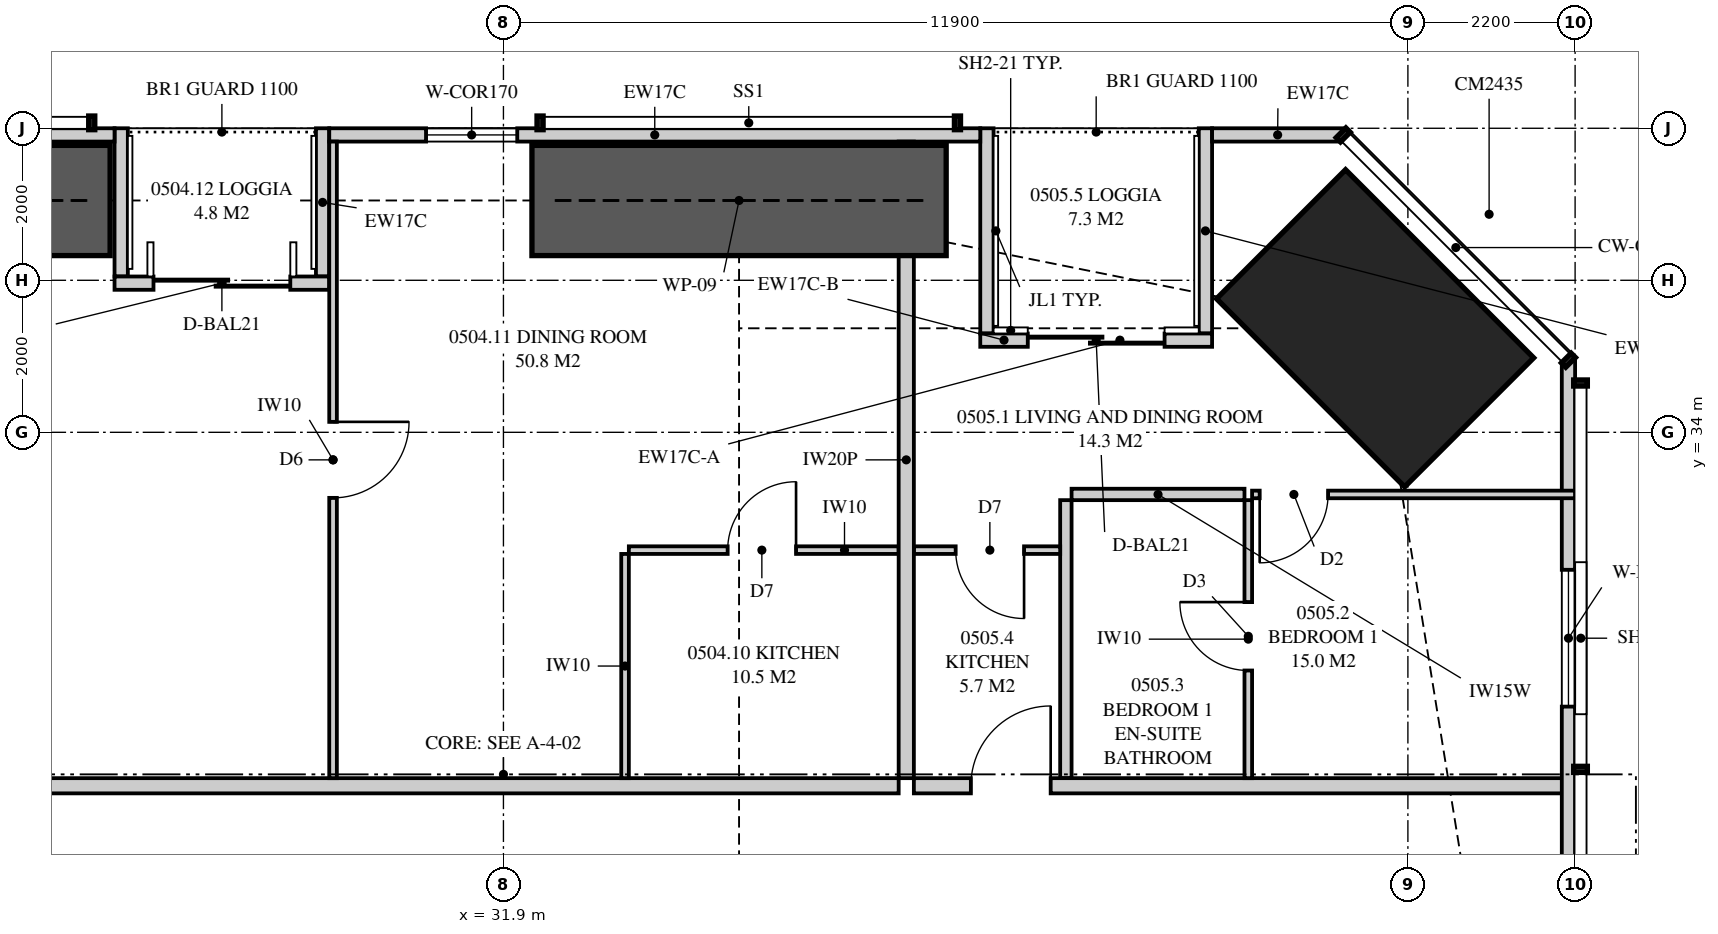
"""IFC4 building model, lengths in metres.
Left out: names, types, materials, properties, quantities, classifications, styles, units other than length and angle.
Written with IfcOpenShell. Run it as: python <this file> out.ifc"""

import sys

from ifc_helpers import new_model, si_unit, direction, frame, frame_2d, origin, origin_2d, place, context, subcontext, project, spatial, polyline, rectangle, outline, extrude, element, fill, save


model = new_model("IFC4")
c1 = context("Model", 3, precision=1e-05, world=origin(), true_north=direction((0.0, 1.0)))
c2 = subcontext(c1, "Body", "Model", "MODEL_VIEW")
j1 = project(units=[si_unit("LENGTHUNIT", "METRE"), si_unit("PLANEANGLEUNIT", "RADIAN")], contexts=[c1])
p1 = place(None, origin())
s1 = spatial("IfcSite", under=j1, at=p1, CompositionType="ELEMENT")
p2 = place(p1, origin())
s2 = spatial("IfcBuilding", under=s1, at=p2, CompositionType="ELEMENT")
p3 = place(p2, frame((0.0, 0.0, 24.35)))
s3 = spatial("IfcBuildingStorey", under=s2, at=p3, CompositionType="ELEMENT", Elevation=24.35)
p4 = place(p3, frame((43.369, 35.369, 0.0), z_axis=(0.0, 0.0, 1.0), x_axis=(-0.707106781187, -0.707106781187, 0.0)))
e1 = element("IfcColumn", 1, at=p4, inside=s3, PredefinedType="COLUMN", context=c2, shape_type="SweptSolid", body=[
    extrude(rectangle(XDim=2.4, YDim=3.5, at=origin_2d()), origin(), (0.0, 0.0, 1.0), 3.35),
])
p5 = place(p3, frame((45.913, 3.051, 0.0), z_axis=(0.0, 0.0, 1.0), x_axis=(0.0, 1.0, 0.0)))
e2 = element("IfcWall", 2, at=p5, inside=s3, PredefinedType="SOLIDWALL", context=c2, shape_type="SweptSolid", body=[
    extrude(outline(polyline([(0.0, 0.0), (31.897, 0.0), (31.897, 3.11), (22.167, 3.11), (22.167, 2.15), (22.074, 2.15), (22.074, 3.11), (21.949, 3.11), (21.949, 2.15), (9.949, 2.15), (9.949, 3.11), (9.823, 3.11), (9.823, 2.15), (9.73, 2.15), (9.73, 3.11), (0.0, 3.11), (0.0, 0.0)])), frame((0.0, 0.087, 0.0), z_axis=(0.0, -1.0, 0.0), x_axis=(1.0, 0.0, 0.0)), (0.0, 0.0, 1.0), 0.175),
])
p6 = place(p5, frame((2.257, 0.0, 0.4)))
e3 = element("IfcOpeningElement", 3, at=p6, cuts=e2, PredefinedType="OPENING", context=c2, shape_type="SweptSolid", body=[
    extrude(rectangle(XDim=1.8, YDim=1.7, at=frame_2d((0.9, 0.85))), frame((0.0, 0.097, 0.0), z_axis=(0.0, -1.0, 0.0), x_axis=(1.0, 0.0, 0.0)), (0.0, 0.0, 1.0), 0.195),
])
p7 = place(p5, frame((14.849, 0.0, 0.4)))
e4 = element("IfcOpeningElement", 4, at=p7, cuts=e2, PredefinedType="OPENING", context=c2, shape_type="SweptSolid", body=[
    extrude(rectangle(XDim=1.2, YDim=1.7, at=frame_2d((0.6, 0.85))), frame((0.0, 0.097, 0.0), z_axis=(0.0, -1.0, 0.0), x_axis=(1.0, 0.0, 0.0)), (0.0, 0.0, 1.0), 0.195),
])
p8 = place(p5, frame((27.34, 0.0, 0.4)))
e5 = element("IfcOpeningElement", 5, at=p8, cuts=e2, PredefinedType="OPENING", context=c2, shape_type="SweptSolid", body=[
    extrude(rectangle(XDim=1.8, YDim=1.7, at=frame_2d((0.9, 0.85))), frame((0.0, 0.097, 0.0), z_axis=(0.0, -1.0, 0.0), x_axis=(1.0, 0.0, 0.0)), (0.0, 0.0, 1.0), 0.195),
])
p9 = place(p3, frame((42.949, 37.913, 0.0), z_axis=(0.0, 0.0, 1.0), x_axis=(-1.0, 0.0, 0.0)))
e6 = element("IfcWall", 6, at=p9, inside=s3, PredefinedType="SOLIDWALL", context=c2, shape_type="SweptSolid", body=[
    extrude(rectangle(XDim=1.725, YDim=0.175, at=frame_2d((0.863, 0.0))), origin(), (0.0, 0.0, 1.0), 3.11),
])
p10 = place(p3, frame((38.174, 37.913, 0.0), z_axis=(0.0, 0.0, 1.0), x_axis=(-1.0, 0.0, 0.0)))
e7 = element("IfcWall", 7, at=p10, inside=s3, PredefinedType="SOLIDWALL", context=c2, shape_type="SweptSolid", body=[
    extrude(outline(polyline([(0.0, 0.0), (8.565, 0.0), (8.565, 2.15), (3.174, 2.15), (3.174, 3.11), (3.018, 3.11), (3.018, 2.15), (2.97, 2.15), (2.97, 3.11), (0.0, 3.11), (0.0, 0.0)])), frame((0.0, 0.087, 0.0), z_axis=(0.0, -1.0, 0.0), x_axis=(1.0, 0.0, 0.0)), (0.0, 0.0, 1.0), 0.175),
])
p11 = place(p10, frame((6.092, 0.0, 0.4)))
e8 = element("IfcOpeningElement", 8, at=p11, cuts=e7, PredefinedType="OPENING", context=c2, shape_type="SweptSolid", body=[
    extrude(rectangle(XDim=1.2, YDim=1.7, at=frame_2d((0.6, 0.85))), frame((0.0, 0.097, 0.0), z_axis=(0.0, -1.0, 0.0), x_axis=(1.0, 0.0, 0.0)), (0.0, 0.0, 1.0), 0.195),
])
p12 = place(p3, frame((26.783, 37.913, 0.0), z_axis=(0.0, 0.0, 1.0), x_axis=(-1.0, 0.0, 0.0)))
e9 = element("IfcWall", 9, at=p12, inside=s3, PredefinedType="SOLIDWALL", context=c2, shape_type="SweptSolid", body=[
    extrude(outline(polyline([(0.0, 0.0), (21.732, 0.0), (21.732, 3.11), (13.987, 3.11), (13.987, 2.15), (13.939, 2.15), (13.939, 3.11), (13.783, 3.11), (13.783, 2.15), (0.0, 2.15), (0.0, 0.0)])), frame((0.0, 0.087, 0.0), z_axis=(0.0, -1.0, 0.0), x_axis=(1.0, 0.0, 0.0)), (0.0, 0.0, 1.0), 0.175),
])
p13 = place(p12, frame((6.258, 0.0, 0.4)))
e10 = element("IfcOpeningElement", 10, at=p13, cuts=e9, PredefinedType="OPENING", context=c2, shape_type="SweptSolid", body=[
    extrude(rectangle(XDim=1.8, YDim=1.7, at=frame_2d((0.9, 0.85))), frame((0.0, 0.097, 0.0), z_axis=(0.0, -1.0, 0.0), x_axis=(1.0, 0.0, 0.0)), (0.0, 0.0, 1.0), 0.195),
])
p14 = place(p12, frame((9.126, 0.0, 0.4)))
e11 = element("IfcOpeningElement", 11, at=p14, cuts=e9, PredefinedType="OPENING", context=c2, shape_type="SweptSolid", body=[
    extrude(rectangle(XDim=1.8, YDim=1.7, at=frame_2d((0.9, 0.85))), frame((0.0, 0.097, 0.0), z_axis=(0.0, -1.0, 0.0), x_axis=(1.0, 0.0, 0.0)), (0.0, 0.0, 1.0), 0.195),
])
p15 = place(p12, frame((16.613, 0.0, 0.4)))
e12 = element("IfcOpeningElement", 12, at=p15, cuts=e9, PredefinedType="OPENING", context=c2, shape_type="SweptSolid", body=[
    extrude(rectangle(XDim=1.8, YDim=1.7, at=frame_2d((0.9, 0.85))), frame((0.0, 0.097, 0.0), z_axis=(0.0, -1.0, 0.0), x_axis=(1.0, 0.0, 0.0)), (0.0, 0.0, 1.0), 0.195),
])
p16 = place(p3, frame((41.224, 35.212, 0.0), z_axis=(0.0, 0.0, 1.0), x_axis=(-1.0, 0.0, 0.0)))
e13 = element("IfcWall", 13, at=p16, inside=s3, PredefinedType="SOLIDWALL", context=c2, shape_type="SweptSolid", body=[
    extrude(rectangle(XDim=2.425, YDim=0.175, at=frame_2d((1.212, 0.0))), origin(), (0.0, 0.0, 1.0), 2.15),
])
p17 = place(p16, frame((0.625, 0.0, 0.0)))
e14 = element("IfcOpeningElement", 14, at=p17, cuts=e13, PredefinedType="OPENING", context=c2, shape_type="SweptSolid", body=[
    extrude(rectangle(XDim=1.8, YDim=2.1, at=frame_2d((0.9, 1.05))), frame((0.0, 0.097, 0.0), z_axis=(0.0, -1.0, 0.0), x_axis=(1.0, 0.0, 0.0)), (0.0, 0.0, 1.0), 0.195),
])
p18 = place(p3, frame((38.799, 35.212, 0.0), z_axis=(0.0, 0.0, 1.0), x_axis=(-1.0, 0.0, 0.0)))
e15 = element("IfcWall", 15, at=p18, inside=s3, PredefinedType="SOLIDWALL", context=c2, shape_type="SweptSolid", body=[
    extrude(rectangle(XDim=0.625, YDim=0.175, at=frame_2d((0.312, 0.0))), origin(), (0.0, 0.0, 1.0), 2.51),
])
p19 = place(p3, frame((41.136, 38.0, 0.0), z_axis=(0.0, 0.0, 1.0), x_axis=(0.0, -1.0, 0.0)))
e16 = element("IfcWall", 16, at=p19, inside=s3, PredefinedType="SOLIDWALL", context=c2, shape_type="SweptSolid", body=[
    extrude(outline(polyline([(0.0, 0.0), (2.7, 0.0), (2.7, 2.15), (1.349, 2.15), (1.349, 3.11), (0.0, 3.11), (0.0, 0.0)])), frame((0.0, 0.087, 0.0), z_axis=(0.0, -1.0, 0.0), x_axis=(1.0, 0.0, 0.0)), (0.0, 0.0, 1.0), 0.175),
])
p20 = place(p3, frame((38.261, 38.0, 0.0), z_axis=(0.0, 0.0, 1.0), x_axis=(0.0, -1.0, 0.0)))
e17 = element("IfcWall", 17, at=p20, inside=s3, PredefinedType="SOLIDWALL", context=c2, shape_type="SweptSolid", body=[
    extrude(outline(polyline([(0.0, 0.0), (2.7, 0.0), (2.7, 2.51), (2.439, 2.51), (2.439, 2.15), (0.772, 2.15), (0.772, 3.11), (0.0, 3.11), (0.0, 0.0)])), frame((0.0, 0.087, 0.0), z_axis=(0.0, -1.0, 0.0), x_axis=(1.0, 0.0, 0.0)), (0.0, 0.0, 1.0), 0.175),
])
p21 = place(p3, frame((29.608, 35.962, 0.0), z_axis=(0.0, 0.0, 1.0), x_axis=(-1.0, 0.0, 0.0)))
e18 = element("IfcWall", 18, at=p21, inside=s3, PredefinedType="SOLIDWALL", context=c2, shape_type="SweptSolid", body=[
    extrude(rectangle(XDim=2.825, YDim=0.175, at=frame_2d((1.413, 0.0))), origin(), (0.0, 0.0, 1.0), 3.11),
])
p22 = place(p21, frame((0.512, 0.0, 0.0)))
e19 = element("IfcOpeningElement", 19, at=p22, cuts=e18, PredefinedType="OPENING", context=c2, shape_type="SweptSolid", body=[
    extrude(rectangle(XDim=1.8, YDim=2.1, at=frame_2d((0.9, 1.05))), frame((0.0, 0.097, 0.0), z_axis=(0.0, -1.0, 0.0), x_axis=(1.0, 0.0, 0.0)), (0.0, 0.0, 1.0), 0.195),
])
for number, where, z_axis, x_axis in (
    (20, (29.521, 38.0, 0.0), (0.0, 0.0, 1.0), (0.0, -1.0, 0.0)),
    (21, (26.871, 38.0, 0.0), (0.0, 0.0, 1.0), (0.0, -1.0, 0.0)),
):
    element("IfcWall", number, at=place(p3, frame(where, z_axis=z_axis, x_axis=x_axis)), inside=s3, PredefinedType="SOLIDWALL", context=c2, shape_type="SweptSolid", body=[
        extrude(outline(polyline([(0.0, 0.0), (1.95, 0.0), (1.95, 3.11), (1.75, 3.11), (1.75, 2.15), (0.15, 2.15), (0.15, 3.11), (0.0, 3.11), (0.0, 0.0)])), frame((0.0, 0.087, 0.0), z_axis=(0.0, -1.0, 0.0), x_axis=(1.0, 0.0, 0.0)), (0.0, 0.0, 1.0), 0.175),
    ])
p23 = place(p3, frame((37.2, 37.825, 0.0), z_axis=(0.0, 0.0, 1.0), x_axis=(0.0, -1.0, 0.0)))
e22 = element("IfcWall", 22, at=p23, inside=s3, PredefinedType="PARTITIONING", context=c2, shape_type="SweptSolid", body=[
    extrude(outline(polyline([(0.0, 0.0), (8.375, 0.0), (8.375, 3.11), (3.766, 3.11), (3.766, 2.51), (2.145, 2.51), (2.145, 2.15), (0.289, 2.15), (0.289, 3.11), (0.0, 3.11), (0.0, 0.0)])), frame((0.0, 0.1, 0.0), z_axis=(0.0, -1.0, 0.0), x_axis=(1.0, 0.0, 0.0)), (0.0, 0.0, 1.0), 0.2),
])
p24 = place(p3, frame((33.55, 32.45, 0.0), z_axis=(0.0, 0.0, 1.0), x_axis=(1.0, 0.0, 0.0)))
e23 = element("IfcWall", 23, at=p24, inside=s3, PredefinedType="PARTITIONING", context=c2, shape_type="SweptSolid", body=[
    extrude(outline(polyline([(0.0, 0.0), (3.55, 0.0), (3.55, 3.11), (1.737, 3.11), (1.737, 2.541), (1.163, 2.541), (1.163, 3.11), (0.0, 3.11), (0.0, 0.0)])), frame((0.0, 0.05, 0.0), z_axis=(0.0, -1.0, 0.0), x_axis=(1.0, 0.0, 0.0)), (0.0, 0.0, 1.0), 0.1),
])
p25 = place(p24, frame((1.3, 0.0, 0.0)))
e24 = element("IfcOpeningElement", 24, at=p25, cuts=e23, PredefinedType="OPENING", context=c2, shape_type="SweptSolid", body=[
    extrude(rectangle(XDim=0.9, YDim=2.1, at=frame_2d((0.45, 1.05))), frame((0.0, 0.06, 0.0), z_axis=(0.0, -1.0, 0.0), x_axis=(1.0, 0.0, 0.0)), (0.0, 0.0, 1.0), 0.12),
])
p26 = place(p3, frame((33.5, 32.4, 0.0), z_axis=(0.0, 0.0, 1.0), x_axis=(0.0, -1.0, 0.0)))
e25 = element("IfcWall", 25, at=p26, inside=s3, PredefinedType="PARTITIONING", context=c2, shape_type="SweptSolid", body=[
    extrude(rectangle(XDim=2.95, YDim=0.1, at=frame_2d((1.475, 0.0))), origin(), (0.0, 0.0, 1.0), 3.11),
])
p27 = place(p3, frame((29.658, 37.825, 0.0), z_axis=(0.0, 0.0, 1.0), x_axis=(0.0, -1.0, 0.0)))
e26 = element("IfcWall", 26, at=p27, inside=s3, PredefinedType="PARTITIONING", context=c2, shape_type="SweptSolid", body=[
    extrude(outline(polyline([(0.0, 0.0), (8.375, 0.0), (8.375, 3.11), (1.635, 3.11), (1.635, 2.15), (0.0, 2.15), (0.0, 3.11), (0.0, 0.0)])), frame((0.0, 0.05, 0.0), z_axis=(0.0, -1.0, 0.0), x_axis=(1.0, 0.0, 0.0)), (0.0, 0.0, 1.0), 0.1),
])
p28 = place(p27, frame((3.688, 0.0, 0.0)))
e27 = element("IfcOpeningElement", 27, at=p28, cuts=e26, PredefinedType="OPENING", context=c2, shape_type="SweptSolid", body=[
    extrude(rectangle(XDim=1.0, YDim=2.1, at=frame_2d((0.5, 1.05))), frame((0.0, 0.06, 0.0), z_axis=(0.0, -1.0, 0.0), x_axis=(1.0, 0.0, 0.0)), (0.0, 0.0, 1.0), 0.12),
])
p29 = place(p3, frame((37.3, 29.35, 0.0), z_axis=(0.0, 0.0, 1.0), x_axis=(1.0, 0.0, 0.0)))
e28 = element("IfcWall", 28, at=p29, inside=s3, PredefinedType="PARTITIONING", context=c2, shape_type="SweptSolid", body=[
    extrude(outline(polyline([(0.0, 0.0), (8.7, 0.0), (8.7, 3.11), (7.967, 3.11), (7.967, 2.15), (6.123, 2.15), (6.123, 3.11), (0.0, 3.11), (0.0, 0.0)])), frame((0.0, 0.1, 0.0), z_axis=(0.0, -1.0, 0.0), x_axis=(1.0, 0.0, 0.0)), (0.0, 0.0, 1.0), 0.2),
])
p30 = place(p29, frame((0.75, 0.0, 0.0)))
e29 = element("IfcOpeningElement", 29, at=p30, cuts=e28, PredefinedType="OPENING", context=c2, shape_type="SweptSolid", body=[
    extrude(rectangle(XDim=1.05, YDim=2.2, at=frame_2d((0.525, 1.1))), frame((0.0, 0.11, 0.0), z_axis=(0.0, -1.0, 0.0), x_axis=(1.0, 0.0, 0.0)), (0.0, 0.0, 1.0), 0.22),
])
p31 = place(p3, frame((41.7, 33.108, 0.0), z_axis=(0.0, 0.0, 1.0), x_axis=(0.0, -1.0, 0.0)))
e30 = element("IfcWall", 30, at=p31, inside=s3, PredefinedType="PARTITIONING", context=c2, shape_type="SweptSolid", body=[
    extrude(rectangle(XDim=3.658, YDim=0.1, at=frame_2d((1.829, 0.0))), origin(), (0.0, 0.0, 1.0), 3.11),
])
p32 = place(p31, frame((1.341, 0.0, 0.0)))
e31 = element("IfcOpeningElement", 31, at=p32, cuts=e30, PredefinedType="OPENING", context=c2, shape_type="SweptSolid", body=[
    extrude(rectangle(XDim=0.9, YDim=2.1, at=frame_2d((0.45, 1.05))), frame((0.0, 0.06, 0.0), z_axis=(0.0, -1.0, 0.0), x_axis=(1.0, 0.0, 0.0)), (0.0, 0.0, 1.0), 0.12),
])
p33 = place(p3, frame((41.75, 33.183, 0.0), z_axis=(0.0, 0.0, 1.0), x_axis=(1.0, 0.0, 0.0)))
e32 = element("IfcWall", 32, at=p33, inside=s3, PredefinedType="PARTITIONING", context=c2, shape_type="SweptSolid", body=[
    extrude(outline(polyline([(0.0, 0.0), (4.25, 0.0), (4.25, 3.11), (2.844, 3.11), (2.844, 2.15), (1.102, 2.15), (1.102, 3.11), (0.0, 3.11), (0.0, 0.0)])), frame((0.0, 0.05, 0.0), z_axis=(0.0, -1.0, 0.0), x_axis=(1.0, 0.0, 0.0)), (0.0, 0.0, 1.0), 0.1),
])
p34 = place(p33, frame((0.1, 0.0, 0.0)))
e33 = element("IfcOpeningElement", 33, at=p34, cuts=e32, PredefinedType="OPENING", context=c2, shape_type="SweptSolid", body=[
    extrude(rectangle(XDim=0.9, YDim=2.1, at=frame_2d((0.45, 1.05))), frame((0.0, 0.06, 0.0), z_axis=(0.0, -1.0, 0.0), x_axis=(1.0, 0.0, 0.0)), (0.0, 0.0, 1.0), 0.12),
])
p35 = place(p3, frame((39.375, 33.183, 0.0), z_axis=(0.0, 0.0, 1.0), x_axis=(1.0, 0.0, 0.0)))
e34 = element("IfcWall", 34, at=p35, inside=s3, PredefinedType="PLUMBINGWALL", context=c2, shape_type="SweptSolid", body=[
    extrude(rectangle(XDim=2.275, YDim=0.15, at=frame_2d((1.137, 0.0))), origin(), (0.0, 0.0, 1.0), 3.11),
])
p36 = place(p3, frame((39.3, 33.108, 0.0), z_axis=(0.0, 0.0, 1.0), x_axis=(0.0, -1.0, 0.0)))
e35 = element("IfcWall", 35, at=p36, inside=s3, PredefinedType="PLUMBINGWALL", context=c2, shape_type="SweptSolid", body=[
    extrude(rectangle(XDim=3.658, YDim=0.15, at=frame_2d((1.829, 0.0))), origin(), (0.0, 0.0, 1.0), 3.11),
])
p37 = place(p3, frame((37.3, 32.45, 0.0), z_axis=(0.0, 0.0, 1.0), x_axis=(1.0, 0.0, 0.0)))
e36 = element("IfcWall", 36, at=p37, inside=s3, PredefinedType="PARTITIONING", context=c2, shape_type="SweptSolid", body=[
    extrude(rectangle(XDim=1.925, YDim=0.1, at=frame_2d((0.962, 0.0))), origin(), (0.0, 0.0, 1.0), 3.11),
])
p38 = place(p37, frame((0.55, 0.0, 0.0)))
e37 = element("IfcOpeningElement", 37, at=p38, cuts=e36, PredefinedType="OPENING", context=c2, shape_type="SweptSolid", body=[
    extrude(rectangle(XDim=0.9, YDim=2.1, at=frame_2d((0.45, 1.05))), frame((0.0, 0.06, 0.0), z_axis=(0.0, -1.0, 0.0), x_axis=(1.0, 0.0, 0.0)), (0.0, 0.0, 1.0), 0.12),
])
p39 = place(p3, frame((24.05, 29.35, 0.0), z_axis=(0.0, 0.0, 1.0), x_axis=(1.0, 0.0, 0.0)))
e38 = element("IfcWall", 38, at=p39, inside=s3, PredefinedType="PARTITIONING", context=c2, shape_type="SweptSolid", body=[
    extrude(outline(polyline([(0.0, 0.0), (13.05, 0.0), (13.05, 3.11), (11.287, 3.11), (11.287, 2.541), (10.613, 2.541), (10.613, 3.11), (0.287, 3.11), (0.287, 2.541), (0.0, 2.541), (0.0, 3.11), (0.0, 0.0)])), frame((0.0, 0.1, 0.0), z_axis=(0.0, -1.0, 0.0), x_axis=(1.0, 0.0, 0.0)), (0.0, 0.0, 1.0), 0.2),
])
for number, where, z_axis, x_axis in (
    (39, (32.275, 37.05, 0.0), (0.0, 0.0, 1.0), (1.0, 0.0, 0.0)),
    (40, (21.275, 37.05, 0.0), (0.0, 0.0, 1.0), (1.0, 0.0, 0.0)),
):
    element("IfcWall", number, at=place(p3, frame(where, z_axis=z_axis, x_axis=x_axis)), inside=s3, PredefinedType="SHEAR", context=c2, shape_type="SweptSolid", body=[
        extrude(rectangle(XDim=5.45, YDim=1.45, at=frame_2d((2.725, 0.0))), origin(), (0.0, 0.0, 1.0), 3.35),
    ])
p40 = place(p8, origin())
e41 = element("IfcWindow", 41, at=p40, inside=s3, PartitioningType="SINGLE_PANEL", PredefinedType="WINDOW", context=c2, shape_type="SweptSolid", body=[
    extrude(rectangle(XDim=1.8, YDim=1.7, at=frame_2d((0.9, 0.85))), frame((0.0, 0.03, 0.0), z_axis=(0.0, -1.0, 0.0), x_axis=(1.0, 0.0, 0.0)), (0.0, 0.0, 1.0), 0.06),
])
fill(e5, e41)
p41 = place(p17, origin())
e42 = element("IfcDoor", 42, at=p41, inside=s3, OperationType="SLIDING_TO_LEFT", PredefinedType="DOOR", context=c2, shape_type="SweptSolid", body=[
    extrude(rectangle(XDim=1.8, YDim=2.1, at=frame_2d((0.9, 1.05))), frame((0.0, 0.025, 0.0), z_axis=(0.0, -1.0, 0.0), x_axis=(1.0, 0.0, 0.0)), (0.0, 0.0, 1.0), 0.05),
])
fill(e14, e42)
p42 = place(p11, origin())
e43 = element("IfcWindow", 43, at=p42, inside=s3, PartitioningType="SINGLE_PANEL", PredefinedType="WINDOW", context=c2, shape_type="SweptSolid", body=[
    extrude(rectangle(XDim=1.2, YDim=1.7, at=frame_2d((0.6, 0.85))), frame((0.0, 0.03, 0.0), z_axis=(0.0, -1.0, 0.0), x_axis=(1.0, 0.0, 0.0)), (0.0, 0.0, 1.0), 0.06),
])
fill(e8, e43)
p43 = place(p22, origin())
e44 = element("IfcDoor", 44, at=p43, inside=s3, OperationType="SLIDING_TO_LEFT", PredefinedType="DOOR", context=c2, shape_type="SweptSolid", body=[
    extrude(rectangle(XDim=1.8, YDim=2.1, at=frame_2d((0.9, 1.05))), frame((0.0, 0.025, 0.0), z_axis=(0.0, -1.0, 0.0), x_axis=(1.0, 0.0, 0.0)), (0.0, 0.0, 1.0), 0.05),
])
fill(e19, e44)
p44 = place(p25, origin())
e45 = element("IfcDoor", 45, at=p44, inside=s3, OperationType="SINGLE_SWING_RIGHT", PredefinedType="DOOR", context=c2, shape_type="SweptSolid", body=[
    extrude(rectangle(XDim=0.9, YDim=2.1, at=frame_2d((0.45, 1.05))), frame((0.0, 0.025, 0.0), z_axis=(0.0, -1.0, 0.0), x_axis=(1.0, 0.0, 0.0)), (0.0, 0.0, 1.0), 0.05),
])
fill(e24, e45)
p45 = place(p28, origin())
e46 = element("IfcDoor", 46, at=p45, inside=s3, OperationType="SINGLE_SWING_LEFT", PredefinedType="DOOR", context=c2, shape_type="SweptSolid", body=[
    extrude(rectangle(XDim=1.0, YDim=2.1, at=frame_2d((0.5, 1.05))), frame((0.0, 0.025, 0.0), z_axis=(0.0, -1.0, 0.0), x_axis=(1.0, 0.0, 0.0)), (0.0, 0.0, 1.0), 0.05),
])
fill(e27, e46)
p46 = place(p30, origin())
e47 = element("IfcDoor", 47, at=p46, inside=s3, OperationType="SINGLE_SWING_RIGHT", PredefinedType="DOOR", context=c2, shape_type="SweptSolid", body=[
    extrude(rectangle(XDim=1.05, YDim=2.2, at=frame_2d((0.525, 1.1))), frame((0.0, 0.025, 0.0), z_axis=(0.0, -1.0, 0.0), x_axis=(1.0, 0.0, 0.0)), (0.0, 0.0, 1.0), 0.05),
])
fill(e29, e47)
p47 = place(p34, frame((0.9, 0.0, 0.0), z_axis=(0.0, 0.0, 1.0), x_axis=(-1.0, 0.0, 0.0)))
e48 = element("IfcDoor", 48, at=p47, inside=s3, OperationType="SINGLE_SWING_RIGHT", PredefinedType="DOOR", context=c2, shape_type="SweptSolid", body=[
    extrude(rectangle(XDim=0.9, YDim=2.1, at=frame_2d((0.45, 1.05))), frame((0.0, 0.025, 0.0), z_axis=(0.0, -1.0, 0.0), x_axis=(1.0, 0.0, 0.0)), (0.0, 0.0, 1.0), 0.05),
])
fill(e33, e48)
p48 = place(p32, frame((0.9, 0.0, 0.0), z_axis=(0.0, 0.0, 1.0), x_axis=(-1.0, 0.0, 0.0)))
e49 = element("IfcDoor", 49, at=p48, inside=s3, OperationType="SINGLE_SWING_RIGHT", PredefinedType="DOOR", context=c2, shape_type="SweptSolid", body=[
    extrude(rectangle(XDim=0.9, YDim=2.1, at=frame_2d((0.45, 1.05))), frame((0.0, 0.025, 0.0), z_axis=(0.0, -1.0, 0.0), x_axis=(1.0, 0.0, 0.0)), (0.0, 0.0, 1.0), 0.05),
])
fill(e31, e49)
p49 = place(p38, frame((0.9, 0.0, 0.0), z_axis=(0.0, 0.0, 1.0), x_axis=(-1.0, 0.0, 0.0)))
e50 = element("IfcDoor", 50, at=p49, inside=s3, OperationType="SINGLE_SWING_LEFT", PredefinedType="DOOR", context=c2, shape_type="SweptSolid", body=[
    extrude(rectangle(XDim=0.9, YDim=2.1, at=frame_2d((0.45, 1.05))), frame((0.0, 0.025, 0.0), z_axis=(0.0, -1.0, 0.0), x_axis=(1.0, 0.0, 0.0)), (0.0, 0.0, 1.0), 0.05),
])
fill(e37, e50)
save(model, sys.argv[1])
